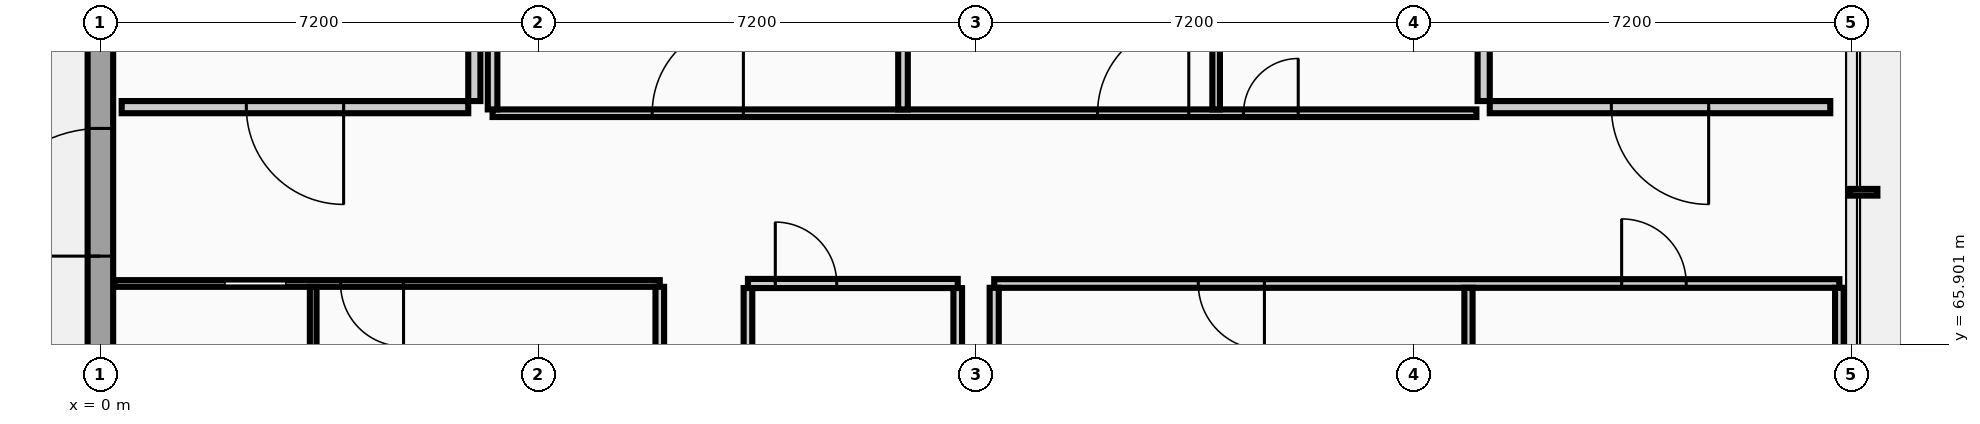
"""IFC4 building model, lengths in metres.
Left out: names, types, materials, properties, quantities, classifications, styles, units other than length and angle.
Written with IfcOpenShell. Run it as: python <this file> out.ifc"""

import sys

from ifc_helpers import new_model, si_unit, direction, frame, frame_2d, origin, place, context, subcontext, project, spatial, rectangle, extrude, element, fill, save


model = new_model("IFC4")
c1 = context("Model", 3, precision=1e-05, world=origin(), true_north=direction((0.0, 1.0)))
c2 = subcontext(c1, "Body", "Model", "MODEL_VIEW")
j1 = project(units=[si_unit("LENGTHUNIT", "METRE"), si_unit("PLANEANGLEUNIT", "RADIAN")], contexts=[c1])
p1 = place(None, origin())
s1 = spatial("IfcSite", under=j1, at=p1, CompositionType="ELEMENT")
p2 = place(p1, origin())
s2 = spatial("IfcBuilding", under=s1, at=p2, CompositionType="ELEMENT")
p3 = place(p2, origin())
s3 = spatial("IfcBuildingStorey", under=s2, at=p3, CompositionType="ELEMENT", Elevation=0.0)
p4 = place(p3, frame((0.0, 72.0, 0.0), z_axis=(0.0, 0.0, 1.0), x_axis=(0.0, -1.0, 0.0)))
e1 = element("IfcWall", 1, at=p4, inside=s3, PredefinedType="STANDARD", context=c2, shape_type="SweptSolid", body=[
    extrude(rectangle(XDim=7.2, YDim=0.42, at=frame_2d((3.6, 0.0))), origin(), (0.0, 0.0, 1.0), 4.565),
])
p5 = place(p4, frame((2.55, 0.0, 0.0)))
e2 = element("IfcOpeningElement", 2, at=p5, cuts=e1, PredefinedType="OPENING", context=c2, shape_type="SweptSolid", body=[
    extrude(rectangle(XDim=2.1, YDim=2.4, at=frame_2d((1.05, 1.2))), frame((0.0, 0.22, 0.0), z_axis=(0.0, -1.0, 0.0), x_axis=(1.0, 0.0, 0.0)), (0.0, 0.0, 1.0), 0.44),
])
p6 = place(p3, frame((0.35, 69.8, 0.0), z_axis=(0.0, 0.0, 1.0), x_axis=(1.0, 0.0, 0.0)))
e3 = element("IfcWall", 3, at=p6, inside=s3, PredefinedType="PARTITIONING", context=c2, shape_type="SweptSolid", body=[
    extrude(rectangle(XDim=5.7, YDim=0.2, at=frame_2d((2.85, 0.0))), origin(), (0.0, 0.0, 1.0), 4.94),
])
p7 = place(p6, frame((2.05, 0.0, 0.0)))
e4 = element("IfcOpeningElement", 4, at=p7, cuts=e3, PredefinedType="OPENING", context=c2, shape_type="SweptSolid", body=[
    extrude(rectangle(XDim=1.6, YDim=2.2, at=frame_2d((0.8, 1.1))), frame((0.0, 0.11, 0.0), z_axis=(0.0, -1.0, 0.0), x_axis=(1.0, 0.0, 0.0)), (0.0, 0.0, 1.0), 0.22),
])
p8 = place(p3, frame((6.15, 69.9, 0.0), z_axis=(0.0, 0.0, 1.0), x_axis=(0.0, 1.0, 0.0)))
e5 = element("IfcWall", 5, at=p8, inside=s3, PredefinedType="PARTITIONING", context=c2, shape_type="SweptSolid", body=[
    extrude(rectangle(XDim=3.2, YDim=0.2, at=frame_2d((1.6, 0.0))), origin(), (0.0, 0.0, 1.0), 4.94),
])
p9 = place(p3, frame((22.85, 69.8, 0.0), z_axis=(0.0, 0.0, 1.0), x_axis=(1.0, 0.0, 0.0)))
e6 = element("IfcWall", 6, at=p9, inside=s3, PredefinedType="PARTITIONING", context=c2, shape_type="SweptSolid", body=[
    extrude(rectangle(XDim=5.6, YDim=0.2, at=frame_2d((2.8, 0.0))), origin(), (0.0, 0.0, 1.0), 4.94),
])
p10 = place(p9, frame((2.0, 0.0, 0.0)))
e7 = element("IfcOpeningElement", 7, at=p10, cuts=e6, PredefinedType="OPENING", context=c2, shape_type="SweptSolid", body=[
    extrude(rectangle(XDim=1.6, YDim=2.2, at=frame_2d((0.8, 1.1))), frame((0.0, 0.11, 0.0), z_axis=(0.0, -1.0, 0.0), x_axis=(1.0, 0.0, 0.0)), (0.0, 0.0, 1.0), 0.22),
])
p11 = place(p3, frame((22.75, 69.9, 0.0), z_axis=(0.0, 0.0, 1.0), x_axis=(0.0, 1.0, 0.0)))
e8 = element("IfcWall", 8, at=p11, inside=s3, PredefinedType="PARTITIONING", context=c2, shape_type="SweptSolid", body=[
    extrude(rectangle(XDim=3.2, YDim=0.2, at=frame_2d((1.6, 0.0))), origin(), (0.0, 0.0, 1.0), 4.94),
])
p12 = place(p3, frame((0.23, 66.9, 0.0), z_axis=(0.0, 0.0, 1.0), x_axis=(1.0, 0.0, 0.0)))
e9 = element("IfcWall", 9, at=p12, inside=s3, PredefinedType="PARTITIONING", context=c2, shape_type="SweptSolid", body=[
    extrude(rectangle(XDim=8.97, YDim=0.11, at=frame_2d((4.485, 0.0))), origin(), (0.0, 0.0, 1.0), 4.94),
])
p13 = place(p12, frame((1.82, 0.0, 0.0)))
e10 = element("IfcOpeningElement", 10, at=p13, cuts=e9, PredefinedType="OPENING", context=c2, shape_type="SweptSolid", body=[
    extrude(rectangle(XDim=1.0, YDim=2.1, at=frame_2d((0.5, 1.05))), frame((0.0, 0.065, 0.0), z_axis=(0.0, -1.0, 0.0), x_axis=(1.0, 0.0, 0.0)), (0.0, 0.0, 1.0), 0.13),
])
p14 = place(p12, frame((3.72, 0.0, 0.0)))
e11 = element("IfcOpeningElement", 11, at=p14, cuts=e9, PredefinedType="OPENING", context=c2, shape_type="SweptSolid", body=[
    extrude(rectangle(XDim=1.036, YDim=2.096, at=frame_2d((0.518, 1.048))), frame((0.0, 0.065, 0.0), z_axis=(0.0, -1.0, 0.0), x_axis=(1.0, 0.0, 0.0)), (0.0, 0.0, 1.0), 0.13),
])
p15 = place(p3, frame((10.65, 66.9, 0.0), z_axis=(0.0, 0.0, 1.0), x_axis=(1.0, 0.0, 0.0)))
e12 = element("IfcWall", 12, at=p15, inside=s3, PredefinedType="PARTITIONING", context=c2, shape_type="SweptSolid", body=[
    extrude(rectangle(XDim=3.45, YDim=0.15, at=frame_2d((1.725, 0.0))), origin(), (0.0, 0.0, 1.0), 4.94),
])
p16 = place(p15, frame((0.45, 0.0, 0.0)))
e13 = element("IfcOpeningElement", 13, at=p16, cuts=e12, PredefinedType="OPENING", context=c2, shape_type="SweptSolid", body=[
    extrude(rectangle(XDim=1.01, YDim=2.096, at=frame_2d((0.505, 1.048))), frame((0.0, 0.085, 0.0), z_axis=(0.0, -1.0, 0.0), x_axis=(1.0, 0.0, 0.0)), (0.0, 0.0, 1.0), 0.17),
])
p17 = place(p3, frame((14.7, 66.9, 0.0), z_axis=(0.0, 0.0, 1.0), x_axis=(1.0, 0.0, 0.0)))
e14 = element("IfcWall", 14, at=p17, inside=s3, PredefinedType="PARTITIONING", context=c2, shape_type="SweptSolid", body=[
    extrude(rectangle(XDim=13.9, YDim=0.142, at=frame_2d((6.95, 0.0))), origin(), (0.0, 0.0, 1.0), 4.94),
])
p18 = place(p17, frame((10.319, 0.0, 0.0)))
e15 = element("IfcOpeningElement", 15, at=p18, cuts=e14, PredefinedType="OPENING", context=c2, shape_type="SweptSolid", body=[
    extrude(rectangle(XDim=1.062, YDim=2.096, at=frame_2d((0.531, 1.048))), frame((0.0, 0.081, 0.0), z_axis=(0.0, -1.0, 0.0), x_axis=(1.0, 0.0, 0.0)), (0.0, 0.0, 1.0), 0.162),
])
p19 = place(p17, frame((3.356, 0.0, 0.0)))
e16 = element("IfcOpeningElement", 16, at=p19, cuts=e14, PredefinedType="OPENING", context=c2, shape_type="SweptSolid", body=[
    extrude(rectangle(XDim=1.088, YDim=2.096, at=frame_2d((0.544, 1.048))), frame((0.0, 0.081, 0.0), z_axis=(0.0, -1.0, 0.0), x_axis=(1.0, 0.0, 0.0)), (0.0, 0.0, 1.0), 0.162),
])
p20 = place(p3, frame((6.45, 69.7, 0.0), z_axis=(0.0, 0.0, 1.0), x_axis=(1.0, 0.0, 0.0)))
e17 = element("IfcWall", 17, at=p20, inside=s3, PredefinedType="PARTITIONING", context=c2, shape_type="SweptSolid", body=[
    extrude(rectangle(XDim=16.18, YDim=0.125, at=frame_2d((8.09, 0.0))), origin(), (0.0, 0.0, 1.0), 4.94),
])
p21 = place(p20, frame((12.35, 0.0, 0.0)))
e18 = element("IfcOpeningElement", 18, at=p21, cuts=e17, PredefinedType="OPENING", context=c2, shape_type="SweptSolid", body=[
    extrude(rectangle(XDim=0.9, YDim=2.1, at=frame_2d((0.45, 1.05))), frame((0.0, 0.073, 0.0), z_axis=(0.0, -1.0, 0.0), x_axis=(1.0, 0.0, 0.0)), (0.0, 0.0, 1.0), 0.145),
])
p22 = place(p20, frame((9.95, 0.0, 0.0)))
e19 = element("IfcOpeningElement", 19, at=p22, cuts=e17, PredefinedType="OPENING", context=c2, shape_type="SweptSolid", body=[
    extrude(rectangle(XDim=1.5, YDim=2.2, at=frame_2d((0.75, 1.1))), frame((0.0, 0.073, 0.0), z_axis=(0.0, -1.0, 0.0), x_axis=(1.0, 0.0, 0.0)), (0.0, 0.0, 1.0), 0.145),
])
p23 = place(p20, frame((2.625, 0.0, 0.0)))
e20 = element("IfcOpeningElement", 20, at=p23, cuts=e17, PredefinedType="OPENING", context=c2, shape_type="SweptSolid", body=[
    extrude(rectangle(XDim=1.5, YDim=2.2, at=frame_2d((0.75, 1.1))), frame((0.0, 0.073, 0.0), z_axis=(0.0, -1.0, 0.0), x_axis=(1.0, 0.0, 0.0)), (0.0, 0.0, 1.0), 0.145),
])
p24 = place(p3, frame((3.5, 51.32, 0.0), z_axis=(0.0, 0.0, 1.0), x_axis=(0.0, 1.0, 0.0)))
e21 = element("IfcWall", 21, at=p24, inside=s3, PredefinedType="PARTITIONING", context=c2, shape_type="SweptSolid", body=[
    extrude(rectangle(XDim=15.525, YDim=0.11, at=frame_2d((7.762, 0.0))), origin(), (0.0, 0.0, 1.0), 4.94),
])
p25 = place(p3, frame((6.45, 69.762, 0.0), z_axis=(0.0, 0.0, 1.0), x_axis=(0.0, 1.0, 0.0)))
e22 = element("IfcWall", 22, at=p25, inside=s3, PredefinedType="PARTITIONING", context=c2, shape_type="SweptSolid", body=[
    extrude(rectangle(XDim=3.163, YDim=0.158, at=frame_2d((1.581, 0.0))), origin(), (0.0, 0.0, 1.0), 4.94),
])
p26 = place(p3, frame((9.2, 60.96, 0.0), z_axis=(0.0, 0.0, 1.0), x_axis=(0.0, 1.0, 0.0)))
e23 = element("IfcWall", 23, at=p26, inside=s3, PredefinedType="PARTITIONING", context=c2, shape_type="SweptSolid", body=[
    extrude(rectangle(XDim=5.885, YDim=0.142, at=frame_2d((2.942, 0.0))), origin(), (0.0, 0.0, 1.0), 4.94),
])
p27 = place(p3, frame((10.65, 60.96, 0.0), z_axis=(0.0, 0.0, 1.0), x_axis=(0.0, 1.0, 0.0)))
e24 = element("IfcWall", 24, at=p27, inside=s3, PredefinedType="PARTITIONING", context=c2, shape_type="SweptSolid", body=[
    extrude(rectangle(XDim=5.865, YDim=0.142, at=frame_2d((2.933, 0.0))), origin(), (0.0, 0.0, 1.0), 4.94),
])
p28 = place(p3, frame((13.2, 69.762, 0.0), z_axis=(0.0, 0.0, 1.0), x_axis=(0.0, 1.0, 0.0)))
e25 = element("IfcWall", 25, at=p28, inside=s3, PredefinedType="PARTITIONING", context=c2, shape_type="SweptSolid", body=[
    extrude(rectangle(XDim=12.038, YDim=0.158, at=frame_2d((6.019, 0.0))), origin(), (0.0, 0.0, 1.0), 4.94),
])
p29 = place(p3, frame((14.1, 65.18, 0.0), z_axis=(0.0, 0.0, 1.0), x_axis=(0.0, 1.0, 0.0)))
e26 = element("IfcWall", 26, at=p29, inside=s3, PredefinedType="PARTITIONING", context=c2, shape_type="SweptSolid", body=[
    extrude(rectangle(XDim=1.645, YDim=0.142, at=frame_2d((0.823, 0.0))), origin(), (0.0, 0.0, 1.0), 4.635),
])
p30 = place(p3, frame((14.7, 65.18, 0.0), z_axis=(0.0, 0.0, 1.0), x_axis=(0.0, 1.0, 0.0)))
e27 = element("IfcWall", 27, at=p30, inside=s3, PredefinedType="PARTITIONING", context=c2, shape_type="SweptSolid", body=[
    extrude(rectangle(XDim=1.649, YDim=0.15, at=frame_2d((0.825, 0.0))), origin(), (0.0, 0.0, 1.0), 4.635),
])
p31 = place(p3, frame((18.35, 69.762, 0.0), z_axis=(0.0, 0.0, 1.0), x_axis=(0.0, 1.0, 0.0)))
e28 = element("IfcWall", 28, at=p31, inside=s3, PredefinedType="PARTITIONING", context=c2, shape_type="SweptSolid", body=[
    extrude(rectangle(XDim=12.038, YDim=0.125, at=frame_2d((6.019, 0.0))), origin(), (0.0, 0.0, 1.0), 4.94),
])
p32 = place(p3, frame((22.5, 51.32, 0.0), z_axis=(0.0, 0.0, 1.0), x_axis=(0.0, 1.0, 0.0)))
e29 = element("IfcWall", 29, at=p32, inside=s3, PredefinedType="PARTITIONING", context=c2, shape_type="SweptSolid", body=[
    extrude(rectangle(XDim=15.509, YDim=0.135, at=frame_2d((7.754, 0.0))), origin(), (0.0, 0.0, 1.0), 4.94),
])
p33 = place(p3, frame((28.6, 65.18, 0.0), z_axis=(0.0, 0.0, 1.0), x_axis=(0.0, 1.0, 0.0)))
e30 = element("IfcWall", 30, at=p33, inside=s3, PredefinedType="PARTITIONING", context=c2, shape_type="SweptSolid", body=[
    extrude(rectangle(XDim=1.649, YDim=0.142, at=frame_2d((0.825, 0.0))), origin(), (0.0, 0.0, 1.0), 4.565),
])
p34 = place(p5, origin())
e31 = element("IfcDoor", 31, at=p34, inside=s3, OperationType="DOUBLE_DOOR_SINGLE_SWING", PredefinedType="DOOR", context=c2, shape_type="SweptSolid", body=[
    extrude(rectangle(XDim=2.1, YDim=2.4, at=frame_2d((1.05, 1.2))), frame((0.0, 0.025, 0.0), z_axis=(0.0, -1.0, 0.0), x_axis=(1.0, 0.0, 0.0)), (0.0, 0.0, 1.0), 0.05),
])
fill(e2, e31)
p35 = place(p7, origin())
e32 = element("IfcDoor", 32, at=p35, inside=s3, OperationType="DOUBLE_DOOR_SINGLE_SWING", PredefinedType="DOOR", context=c2, shape_type="SweptSolid", body=[
    extrude(rectangle(XDim=1.6, YDim=2.2, at=frame_2d((0.8, 1.1))), frame((0.0, 0.025, 0.0), z_axis=(0.0, -1.0, 0.0), x_axis=(1.0, 0.0, 0.0)), (0.0, 0.0, 1.0), 0.05),
])
fill(e4, e32)
p36 = place(p10, origin())
e33 = element("IfcDoor", 33, at=p36, inside=s3, OperationType="DOUBLE_DOOR_SINGLE_SWING", PredefinedType="DOOR", context=c2, shape_type="SweptSolid", body=[
    extrude(rectangle(XDim=1.6, YDim=2.2, at=frame_2d((0.8, 1.1))), frame((0.0, 0.025, 0.0), z_axis=(0.0, -1.0, 0.0), x_axis=(1.0, 0.0, 0.0)), (0.0, 0.0, 1.0), 0.05),
])
fill(e7, e33)
p37 = place(p13, origin())
e34 = element("IfcDoor", 34, at=p37, inside=s3, OperationType="SLIDING_TO_LEFT", PredefinedType="DOOR", context=c2, shape_type="SweptSolid", body=[
    extrude(rectangle(XDim=1.0, YDim=2.1, at=frame_2d((0.5, 1.05))), frame((0.0, 0.025, 0.0), z_axis=(0.0, -1.0, 0.0), x_axis=(1.0, 0.0, 0.0)), (0.0, 0.0, 1.0), 0.05),
])
fill(e10, e34)
p38 = place(p21, frame((0.9, 0.0, 0.0), z_axis=(0.0, 0.0, 1.0), x_axis=(-1.0, 0.0, 0.0)))
e35 = element("IfcDoor", 35, at=p38, inside=s3, OperationType="SINGLE_SWING_RIGHT", PredefinedType="DOOR", context=c2, shape_type="SweptSolid", body=[
    extrude(rectangle(XDim=0.9, YDim=2.1, at=frame_2d((0.45, 1.05))), frame((0.0, 0.025, 0.0), z_axis=(0.0, -1.0, 0.0), x_axis=(1.0, 0.0, 0.0)), (0.0, 0.0, 1.0), 0.05),
])
fill(e18, e35)
p39 = place(p16, origin())
e36 = element("IfcDoor", 36, at=p39, inside=s3, OperationType="SINGLE_SWING_LEFT", PredefinedType="DOOR", context=c2, shape_type="SweptSolid", body=[
    extrude(rectangle(XDim=1.01, YDim=2.096, at=frame_2d((0.505, 1.048))), frame((0.0, 0.025, 0.0), z_axis=(0.0, -1.0, 0.0), x_axis=(1.0, 0.0, 0.0)), (0.0, 0.0, 1.0), 0.05),
])
fill(e13, e36)
p40 = place(p22, frame((1.5, 0.0, 0.0), z_axis=(0.0, 0.0, 1.0), x_axis=(-1.0, 0.0, 0.0)))
e37 = element("IfcDoor", 37, at=p40, inside=s3, OperationType="DOUBLE_DOOR_SINGLE_SWING", PredefinedType="DOOR", context=c2, shape_type="SweptSolid", body=[
    extrude(rectangle(XDim=1.5, YDim=2.2, at=frame_2d((0.75, 1.1))), frame((0.0, 0.025, 0.0), z_axis=(0.0, -1.0, 0.0), x_axis=(1.0, 0.0, 0.0)), (0.0, 0.0, 1.0), 0.05),
])
fill(e19, e37)
p41 = place(p23, frame((1.5, 0.0, 0.0), z_axis=(0.0, 0.0, 1.0), x_axis=(-1.0, 0.0, 0.0)))
e38 = element("IfcDoor", 38, at=p41, inside=s3, OperationType="DOUBLE_DOOR_SINGLE_SWING", PredefinedType="DOOR", context=c2, shape_type="SweptSolid", body=[
    extrude(rectangle(XDim=1.5, YDim=2.2, at=frame_2d((0.75, 1.1))), frame((0.0, 0.025, 0.0), z_axis=(0.0, -1.0, 0.0), x_axis=(1.0, 0.0, 0.0)), (0.0, 0.0, 1.0), 0.05),
])
fill(e20, e38)
p42 = place(p14, origin())
e39 = element("IfcDoor", 39, at=p42, inside=s3, OperationType="SINGLE_SWING_RIGHT", PredefinedType="DOOR", context=c2, shape_type="SweptSolid", body=[
    extrude(rectangle(XDim=1.036, YDim=2.096, at=frame_2d((0.518, 1.048))), frame((0.0, 0.025, 0.0), z_axis=(0.0, -1.0, 0.0), x_axis=(1.0, 0.0, 0.0)), (0.0, 0.0, 1.0), 0.05),
])
fill(e11, e39)
p43 = place(p18, origin())
e40 = element("IfcDoor", 40, at=p43, inside=s3, OperationType="SINGLE_SWING_LEFT", PredefinedType="DOOR", context=c2, shape_type="SweptSolid", body=[
    extrude(rectangle(XDim=1.062, YDim=2.096, at=frame_2d((0.531, 1.048))), frame((0.0, 0.025, 0.0), z_axis=(0.0, -1.0, 0.0), x_axis=(1.0, 0.0, 0.0)), (0.0, 0.0, 1.0), 0.05),
])
fill(e15, e40)
p44 = place(p19, origin())
e41 = element("IfcDoor", 41, at=p44, inside=s3, OperationType="SINGLE_SWING_RIGHT", PredefinedType="DOOR", context=c2, shape_type="SweptSolid", body=[
    extrude(rectangle(XDim=1.088, YDim=2.096, at=frame_2d((0.544, 1.048))), frame((0.0, 0.025, 0.0), z_axis=(0.0, -1.0, 0.0), x_axis=(1.0, 0.0, 0.0)), (0.0, 0.0, 1.0), 0.05),
])
fill(e16, e41)
save(model, sys.argv[1])
